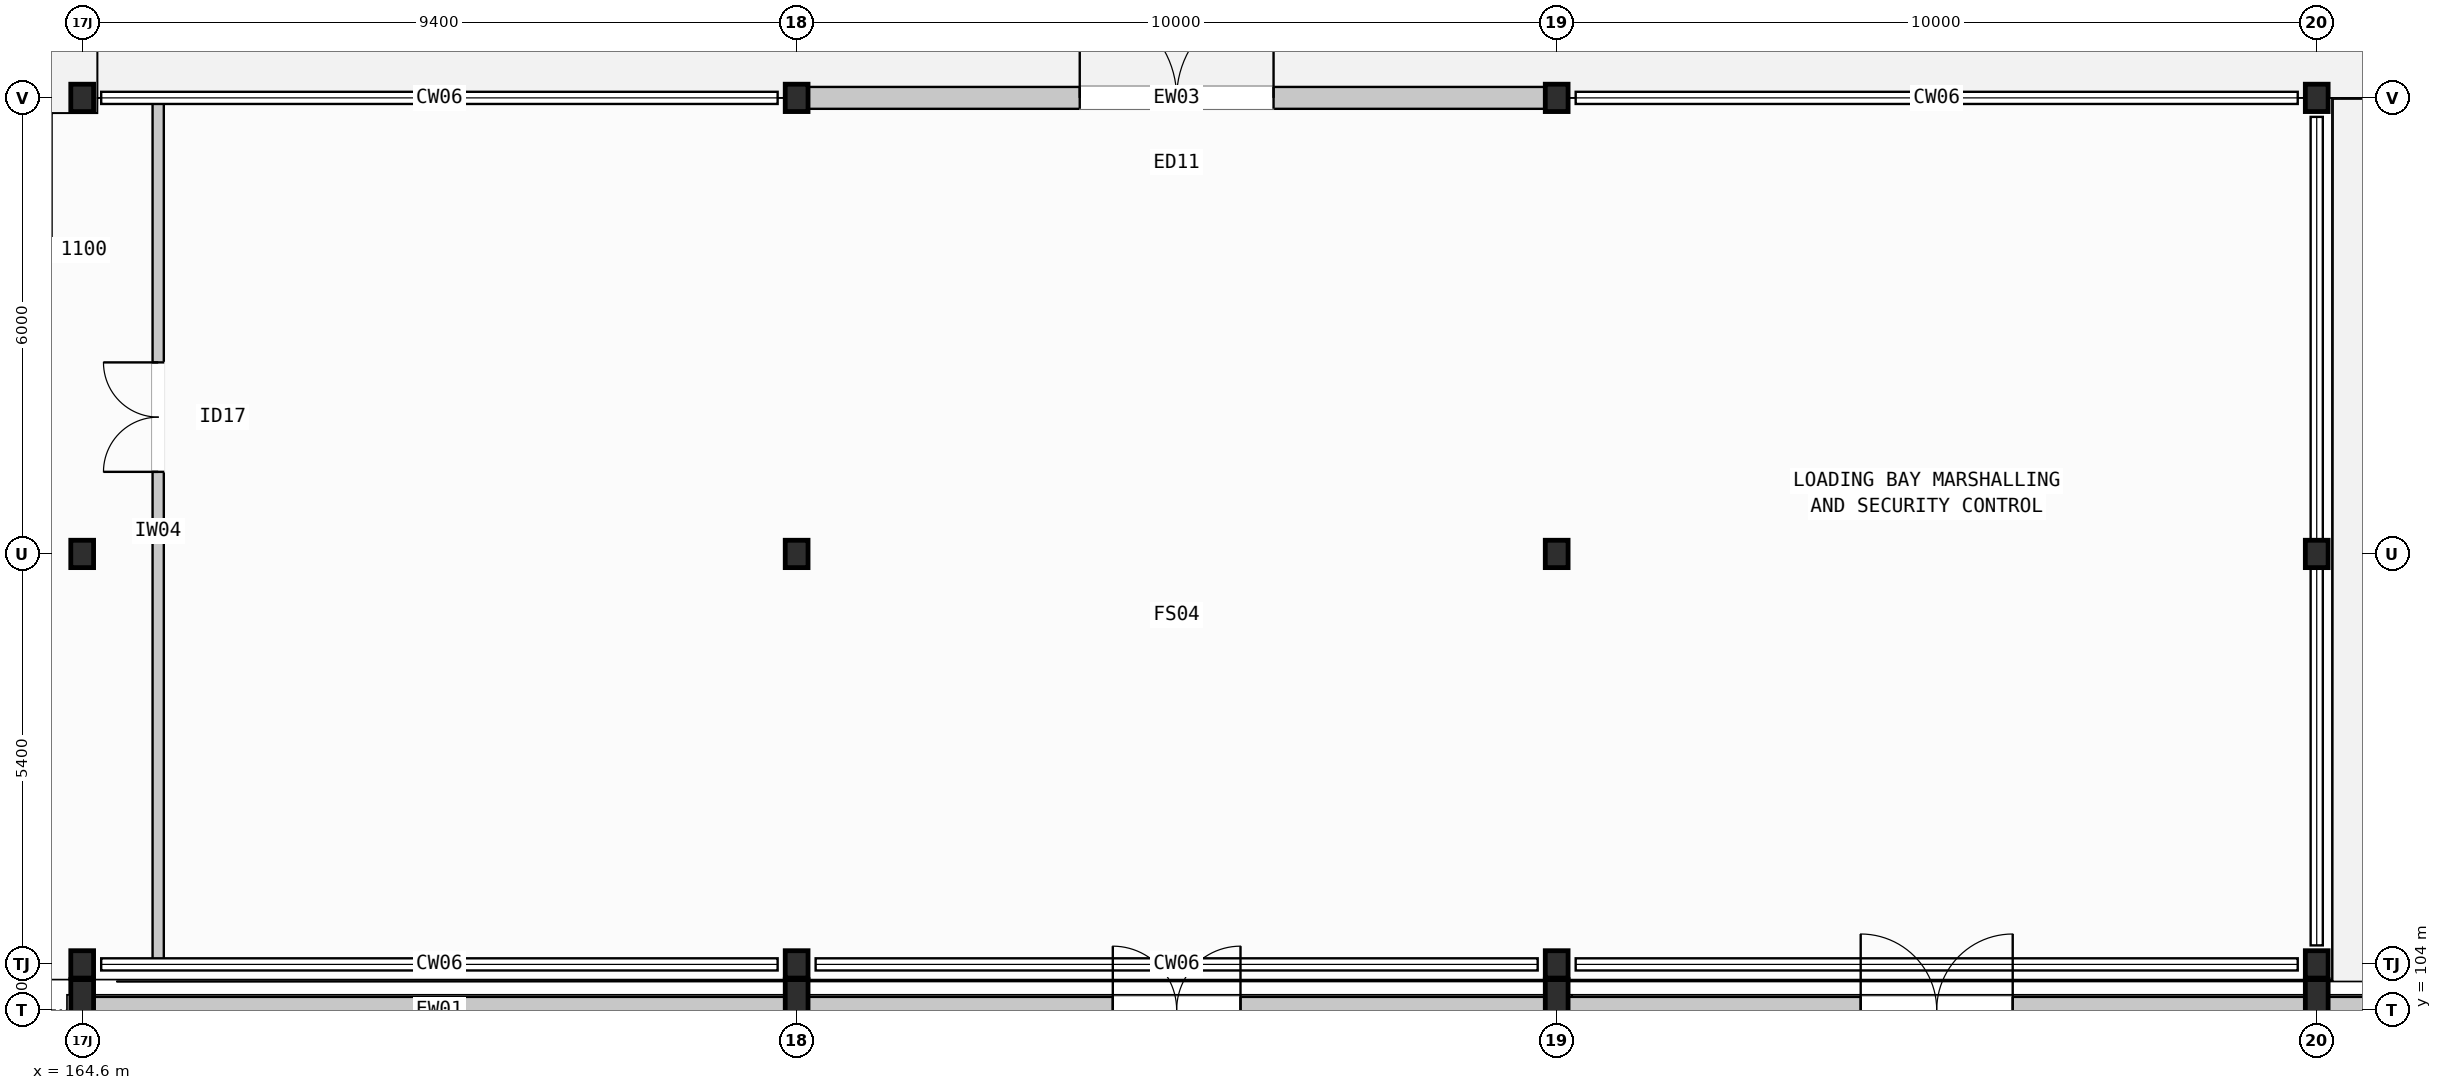
"""IFC4 building model, lengths in metres.
Left out: names, types, materials, properties, quantities, classifications, styles, units other than length and angle.
Written with IfcOpenShell. Run it as: python <this file> out.ifc"""

import sys

from ifc_helpers import new_model, si_unit, direction, frame, frame_2d, origin, origin_2d, place, context, subcontext, project, spatial, rectangle, i_section, extrude, element, fill, save


model = new_model("IFC4")
c1 = context("Model", 3, precision=1e-05, world=origin(), true_north=direction((0.0, 1.0)))
c2 = subcontext(c1, "Body", "Model", "MODEL_VIEW")
j1 = project(units=[si_unit("LENGTHUNIT", "METRE"), si_unit("PLANEANGLEUNIT", "RADIAN")], contexts=[c1])
p1 = place(None, origin())
s1 = spatial("IfcSite", under=j1, at=p1, CompositionType="ELEMENT")
p2 = place(p1, origin())
s2 = spatial("IfcBuilding", under=s1, at=p2, CompositionType="ELEMENT")
p3 = place(p2, origin())
s3 = spatial("IfcBuildingStorey", under=s2, at=p3, CompositionType="ELEMENT", Elevation=0.0)
p4 = place(p3, frame((164.6, 104.0, 0.0), z_axis=(0.0, 0.0, 1.0), x_axis=(1.0, 0.0, 0.0)))
e1 = element("IfcColumn", 1, at=p4, inside=s3, PredefinedType="COLUMN", context=c2, shape_type="SweptSolid", body=[
    extrude(i_section(OverallWidth=0.3, OverallDepth=0.8, WebThickness=0.018, FlangeThickness=0.033, FilletRadius=0.03, at=origin_2d()), origin(), (0.0, 0.0, 1.0), 6.0),
])
for number, where, z_axis, x_axis in (
    (2, (164.6, 104.6, 0.0), (0.0, 0.0, 1.0), (1.0, 0.0, 0.0)),
    (3, (164.6, 110.0, 0.0), (0.0, 0.0, 1.0), (1.0, 0.0, 0.0)),
    (4, (164.6, 116.0, 0.0), (0.0, 0.0, 1.0), (1.0, 0.0, 0.0)),
):
    element("IfcColumn", number, at=place(p3, frame(where, z_axis=z_axis, x_axis=x_axis)), inside=s3, PredefinedType="COLUMN", context=c2, shape_type="SweptSolid", body=[
        extrude(i_section(OverallWidth=0.3, OverallDepth=0.36, WebThickness=0.012, FlangeThickness=0.022, FilletRadius=0.027, at=origin_2d()), origin(), (0.0, 0.0, 1.0), 6.0),
    ])
p5 = place(p3, frame((174.0, 104.0, 0.0), z_axis=(0.0, 0.0, 1.0), x_axis=(1.0, 0.0, 0.0)))
e5 = element("IfcColumn", 5, at=p5, inside=s3, PredefinedType="COLUMN", context=c2, shape_type="SweptSolid", body=[
    extrude(i_section(OverallWidth=0.3, OverallDepth=0.8, WebThickness=0.018, FlangeThickness=0.033, FilletRadius=0.03, at=origin_2d()), origin(), (0.0, 0.0, 1.0), 6.0),
])
for number, where, z_axis, x_axis in (
    (6, (174.0, 104.6, 0.0), (0.0, 0.0, 1.0), (1.0, 0.0, 0.0)),
    (7, (174.0, 110.0, 0.0), (0.0, 0.0, 1.0), (1.0, 0.0, 0.0)),
    (8, (174.0, 116.0, 0.0), (0.0, 0.0, 1.0), (1.0, 0.0, 0.0)),
):
    element("IfcColumn", number, at=place(p3, frame(where, z_axis=z_axis, x_axis=x_axis)), inside=s3, PredefinedType="COLUMN", context=c2, shape_type="SweptSolid", body=[
        extrude(i_section(OverallWidth=0.3, OverallDepth=0.36, WebThickness=0.012, FlangeThickness=0.022, FilletRadius=0.027, at=origin_2d()), origin(), (0.0, 0.0, 1.0), 6.0),
    ])
p6 = place(p3, frame((184.0, 104.0, 0.0), z_axis=(0.0, 0.0, 1.0), x_axis=(1.0, 0.0, 0.0)))
e9 = element("IfcColumn", 9, at=p6, inside=s3, PredefinedType="COLUMN", context=c2, shape_type="SweptSolid", body=[
    extrude(i_section(OverallWidth=0.3, OverallDepth=0.8, WebThickness=0.018, FlangeThickness=0.033, FilletRadius=0.03, at=origin_2d()), origin(), (0.0, 0.0, 1.0), 6.0),
])
for number, where, z_axis, x_axis in (
    (10, (184.0, 104.6, 0.0), (0.0, 0.0, 1.0), (1.0, 0.0, 0.0)),
    (11, (184.0, 110.0, 0.0), (0.0, 0.0, 1.0), (1.0, 0.0, 0.0)),
    (12, (184.0, 116.0, 0.0), (0.0, 0.0, 1.0), (1.0, 0.0, 0.0)),
):
    element("IfcColumn", number, at=place(p3, frame(where, z_axis=z_axis, x_axis=x_axis)), inside=s3, PredefinedType="COLUMN", context=c2, shape_type="SweptSolid", body=[
        extrude(i_section(OverallWidth=0.3, OverallDepth=0.36, WebThickness=0.012, FlangeThickness=0.022, FilletRadius=0.027, at=origin_2d()), origin(), (0.0, 0.0, 1.0), 6.0),
    ])
p7 = place(p3, frame((194.0, 104.0, 0.0), z_axis=(0.0, 0.0, 1.0), x_axis=(1.0, 0.0, 0.0)))
e13 = element("IfcColumn", 13, at=p7, inside=s3, PredefinedType="COLUMN", context=c2, shape_type="SweptSolid", body=[
    extrude(i_section(OverallWidth=0.3, OverallDepth=0.8, WebThickness=0.018, FlangeThickness=0.033, FilletRadius=0.03, at=origin_2d()), origin(), (0.0, 0.0, 1.0), 6.0),
])
for number, where, z_axis, x_axis in (
    (14, (194.0, 104.6, 0.0), (0.0, 0.0, 1.0), (1.0, 0.0, 0.0)),
    (15, (194.0, 110.0, 0.0), (0.0, 0.0, 1.0), (1.0, 0.0, 0.0)),
    (16, (194.0, 116.0, 0.0), (0.0, 0.0, 1.0), (1.0, 0.0, 0.0)),
):
    element("IfcColumn", number, at=place(p3, frame(where, z_axis=z_axis, x_axis=x_axis)), inside=s3, PredefinedType="COLUMN", context=c2, shape_type="SweptSolid", body=[
        extrude(i_section(OverallWidth=0.3, OverallDepth=0.36, WebThickness=0.012, FlangeThickness=0.022, FilletRadius=0.027, at=origin_2d()), origin(), (0.0, 0.0, 1.0), 6.0),
    ])
p8 = place(p3, frame((164.746, 104.0, 0.0), z_axis=(0.0, 0.0, 1.0), x_axis=(1.0, 0.0, 0.0)))
e17 = element("IfcWall", 17, at=p8, inside=s3, PredefinedType="STANDARD", context=c2, shape_type="SweptSolid", body=[
    extrude(rectangle(XDim=9.108, YDim=0.345, at=frame_2d((4.554, 0.0))), origin(), (0.0, 0.0, 1.0), 5.1),
])
p9 = place(p3, frame((174.146, 104.0, 0.0), z_axis=(0.0, 0.0, 1.0), x_axis=(1.0, 0.0, 0.0)))
e18 = element("IfcWall", 18, at=p9, inside=s3, PredefinedType="STANDARD", context=c2, shape_type="SweptSolid", body=[
    extrude(rectangle(XDim=9.708, YDim=0.345, at=frame_2d((4.854, 0.0))), origin(), (0.0, 0.0, 1.0), 5.1),
])
p10 = place(p9, frame((4.014, 0.0, 0.0)))
e19 = element("IfcOpeningElement", 19, at=p10, cuts=e18, PredefinedType="OPENING", context=c2, shape_type="SweptSolid", body=[
    extrude(rectangle(XDim=1.68, YDim=2.22, at=frame_2d((0.84, 1.11))), frame((0.0, 0.183, 0.0), z_axis=(0.0, -1.0, 0.0), x_axis=(1.0, 0.0, 0.0)), (0.0, 0.0, 1.0), 0.365),
])
p11 = place(p3, frame((184.146, 104.0, 0.0), z_axis=(0.0, 0.0, 1.0), x_axis=(1.0, 0.0, 0.0)))
e20 = element("IfcWall", 20, at=p11, inside=s3, PredefinedType="STANDARD", context=c2, shape_type="SweptSolid", body=[
    extrude(rectangle(XDim=9.708, YDim=0.345, at=frame_2d((4.854, 0.0))), origin(), (0.0, 0.0, 1.0), 5.1),
])
p12 = place(p11, frame((3.854, 0.0, 0.0)))
e21 = element("IfcOpeningElement", 21, at=p12, cuts=e20, PredefinedType="OPENING", context=c2, shape_type="SweptSolid", body=[
    extrude(rectangle(XDim=2.0, YDim=2.3, at=frame_2d((1.0, 1.15))), frame((0.0, 0.183, 0.0), z_axis=(0.0, -1.0, 0.0), x_axis=(1.0, 0.0, 0.0)), (0.0, 0.0, 1.0), 0.365),
])
p13 = place(p3, frame((194.146, 104.0, 0.0), z_axis=(0.0, 0.0, 1.0), x_axis=(1.0, 0.0, 0.0)))
e22 = element("IfcWall", 22, at=p13, inside=s3, PredefinedType="STANDARD", context=c2, shape_type="SweptSolid", body=[
    extrude(rectangle(XDim=9.708, YDim=0.345, at=frame_2d((4.854, 0.0))), origin(), (0.0, 0.0, 1.0), 5.1),
])
p14 = place(p3, frame((174.146, 116.0, 0.0), z_axis=(0.0, 0.0, 1.0), x_axis=(1.0, 0.0, 0.0)))
e23 = element("IfcWall", 23, at=p14, inside=s3, PredefinedType="STANDARD", context=c2, shape_type="SweptSolid", body=[
    extrude(rectangle(XDim=9.708, YDim=0.288, at=frame_2d((4.854, 0.0))), origin(), (0.0, 0.0, 1.0), 5.098),
])
p15 = place(p14, frame((3.579, 0.0, 0.0)))
e24 = element("IfcOpeningElement", 24, at=p15, cuts=e23, PredefinedType="OPENING", context=c2, shape_type="SweptSolid", body=[
    extrude(rectangle(XDim=2.55, YDim=2.55, at=frame_2d((1.275, 1.275))), frame((0.0, 0.154, 0.0), z_axis=(0.0, -1.0, 0.0), x_axis=(1.0, 0.0, 0.0)), (0.0, 0.0, 1.0), 0.308),
])
p16 = place(p3, frame((165.6, 104.6, 0.0), z_axis=(0.0, 0.0, 1.0), x_axis=(0.0, 1.0, 0.0)))
e25 = element("IfcWall", 25, at=p16, inside=s3, PredefinedType="PARTITIONING", context=c2, shape_type="SweptSolid", body=[
    extrude(rectangle(XDim=11.4, YDim=0.148, at=frame_2d((5.7, 0.0))), origin(), (0.0, 0.0, 1.0), 4.9),
])
p17 = place(p16, frame((6.48, 0.0, 0.0)))
e26 = element("IfcOpeningElement", 26, at=p17, cuts=e25, PredefinedType="OPENING", context=c2, shape_type="SweptSolid", body=[
    extrude(rectangle(XDim=1.44, YDim=2.2, at=frame_2d((0.72, 1.1))), frame((0.0, 0.084, 0.0), z_axis=(0.0, -1.0, 0.0), x_axis=(1.0, 0.0, 0.0)), (0.0, 0.0, 1.0), 0.168),
])
p18 = place(p10, origin())
e27 = element("IfcDoor", 27, at=p18, inside=s3, OperationType="DOUBLE_DOOR_SINGLE_SWING", PredefinedType="DOOR", context=c2, shape_type="SweptSolid", body=[
    extrude(rectangle(XDim=1.68, YDim=2.22, at=frame_2d((0.84, 1.11))), frame((0.0, 0.025, 0.0), z_axis=(0.0, -1.0, 0.0), x_axis=(1.0, 0.0, 0.0)), (0.0, 0.0, 1.0), 0.05),
])
fill(e19, e27)
p19 = place(p12, origin())
e28 = element("IfcDoor", 28, at=p19, inside=s3, OperationType="DOUBLE_DOOR_SINGLE_SWING", PredefinedType="DOOR", context=c2, shape_type="SweptSolid", body=[
    extrude(rectangle(XDim=2.0, YDim=2.3, at=frame_2d((1.0, 1.15))), frame((0.0, 0.025, 0.0), z_axis=(0.0, -1.0, 0.0), x_axis=(1.0, 0.0, 0.0)), (0.0, 0.0, 1.0), 0.05),
])
fill(e21, e28)
p20 = place(p15, origin())
e29 = element("IfcDoor", 29, at=p20, inside=s3, OperationType="DOUBLE_DOOR_SINGLE_SWING", PredefinedType="DOOR", context=c2, shape_type="SweptSolid", body=[
    extrude(rectangle(XDim=2.55, YDim=2.55, at=frame_2d((1.275, 1.275))), frame((0.0, 0.025, 0.0), z_axis=(0.0, -1.0, 0.0), x_axis=(1.0, 0.0, 0.0)), (0.0, 0.0, 1.0), 0.05),
])
fill(e24, e29)
p21 = place(p17, origin())
e30 = element("IfcDoor", 30, at=p21, inside=s3, OperationType="DOUBLE_DOOR_SINGLE_SWING", PredefinedType="DOOR", context=c2, shape_type="SweptSolid", body=[
    extrude(rectangle(XDim=1.44, YDim=2.2, at=frame_2d((0.72, 1.1))), frame((0.0, 0.025, 0.0), z_axis=(0.0, -1.0, 0.0), x_axis=(1.0, 0.0, 0.0)), (0.0, 0.0, 1.0), 0.05),
])
fill(e26, e30)
save(model, sys.argv[1])
